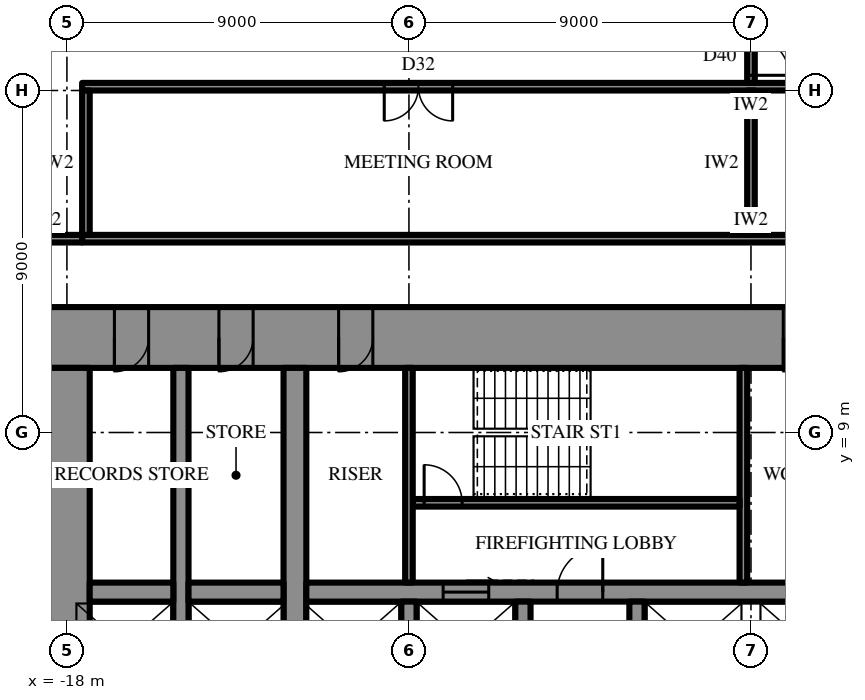
"""IFC4 building model, lengths in metres.
Left out: names, types, materials, properties, quantities, classifications, styles, units other than length and angle.
Written with IfcOpenShell. Run it as: python <this file> out.ifc"""

import sys

from ifc_helpers import new_model, si_unit, direction, frame, frame_2d, origin, place, context, subcontext, project, spatial, rectangle, extrude, element, fill, save


model = new_model("IFC4")
c1 = context("Model", 3, precision=1e-05, world=origin(), true_north=direction((0.0, 1.0)))
c2 = subcontext(c1, "Body", "Model", "MODEL_VIEW")
j1 = project(units=[si_unit("LENGTHUNIT", "METRE"), si_unit("PLANEANGLEUNIT", "RADIAN")], contexts=[c1])
p1 = place(None, origin())
s1 = spatial("IfcSite", under=j1, at=p1, CompositionType="ELEMENT")
p2 = place(p1, origin())
s2 = spatial("IfcBuilding", under=s1, at=p2, CompositionType="ELEMENT")
p3 = place(p2, frame((0.0, 0.0, 27.7)))
s3 = spatial("IfcBuildingStorey", under=s2, at=p3, CompositionType="ELEMENT", Elevation=27.7)
p4 = place(p3, frame((-18.6, 11.5, 0.0), z_axis=(0.0, 0.0, 1.0), x_axis=(1.0, 0.0, 0.0)))
e1 = element("IfcWall", 1, at=p4, inside=s3, PredefinedType="SHEAR", context=c2, shape_type="SweptSolid", body=[
    extrude(rectangle(XDim=37.2, YDim=1.6, at=frame_2d((18.6, 0.0))), origin(), (0.0, 0.0, 1.0), 4.2),
])
p5 = place(p4, frame((19.45, 0.0, 0.0)))
e2 = element("IfcOpeningElement", 2, at=p5, cuts=e1, PredefinedType="OPENING", context=c2, shape_type="SweptSolid", body=[
    extrude(rectangle(XDim=0.9, YDim=2.2, at=frame_2d((0.45, 1.1))), frame((0.0, 0.81, 0.0), z_axis=(0.0, -1.0, 0.0), x_axis=(1.0, 0.0, 0.0)), (0.0, 0.0, 1.0), 1.62),
])
p6 = place(p4, frame((22.45, 0.0, 0.0)))
e3 = element("IfcOpeningElement", 3, at=p6, cuts=e1, PredefinedType="OPENING", context=c2, shape_type="SweptSolid", body=[
    extrude(rectangle(XDim=0.9, YDim=2.2, at=frame_2d((0.45, 1.1))), frame((0.0, 0.81, 0.0), z_axis=(0.0, -1.0, 0.0), x_axis=(1.0, 0.0, 0.0)), (0.0, 0.0, 1.0), 1.62),
])
p7 = place(p4, frame((25.5, 0.0, 0.0)))
e4 = element("IfcOpeningElement", 4, at=p7, cuts=e1, PredefinedType="OPENING", context=c2, shape_type="SweptSolid", body=[
    extrude(rectangle(XDim=1.0, YDim=2.2, at=frame_2d((0.5, 1.1))), frame((0.0, 0.81, 0.0), z_axis=(0.0, -1.0, 0.0), x_axis=(1.0, 0.0, 0.0)), (0.0, 0.0, 1.0), 1.62),
])
p8 = place(p4, frame((1.85, 0.0, 0.0)))
e5 = element("IfcOpeningElement", 5, at=p8, cuts=e1, PredefinedType="OPENING", context=c2, shape_type="SweptSolid", body=[
    extrude(rectangle(XDim=0.9, YDim=2.2, at=frame_2d((0.45, 1.1))), frame((0.0, 0.81, 0.0), z_axis=(0.0, -1.0, 0.0), x_axis=(1.0, 0.0, 0.0)), (0.0, 0.0, 1.0), 1.62),
])
p9 = place(p4, frame((4.6, 0.0, 0.0)))
e6 = element("IfcOpeningElement", 6, at=p9, cuts=e1, PredefinedType="OPENING", context=c2, shape_type="SweptSolid", body=[
    extrude(rectangle(XDim=0.9, YDim=2.2, at=frame_2d((0.45, 1.1))), frame((0.0, 0.81, 0.0), z_axis=(0.0, -1.0, 0.0), x_axis=(1.0, 0.0, 0.0)), (0.0, 0.0, 1.0), 1.62),
])
p10 = place(p4, frame((7.75, 0.0, 0.0)))
e7 = element("IfcOpeningElement", 7, at=p10, cuts=e1, PredefinedType="OPENING", context=c2, shape_type="SweptSolid", body=[
    extrude(rectangle(XDim=0.9, YDim=2.2, at=frame_2d((0.45, 1.1))), frame((0.0, 0.81, 0.0), z_axis=(0.0, -1.0, 0.0), x_axis=(1.0, 0.0, 0.0)), (0.0, 0.0, 1.0), 1.62),
])
p11 = place(p4, frame((28.55, 0.0, 0.0)))
e8 = element("IfcOpeningElement", 8, at=p11, cuts=e1, PredefinedType="OPENING", context=c2, shape_type="SweptSolid", body=[
    extrude(rectangle(XDim=0.9, YDim=2.2, at=frame_2d((0.45, 1.1))), frame((0.0, 0.81, 0.0), z_axis=(0.0, -1.0, 0.0), x_axis=(1.0, 0.0, 0.0)), (0.0, 0.0, 1.0), 1.62),
])
p12 = place(p4, frame((31.7, 0.0, 0.0)))
e9 = element("IfcOpeningElement", 9, at=p12, cuts=e1, PredefinedType="OPENING", context=c2, shape_type="SweptSolid", body=[
    extrude(rectangle(XDim=0.9, YDim=2.2, at=frame_2d((0.45, 1.1))), frame((0.0, 0.81, 0.0), z_axis=(0.0, -1.0, 0.0), x_axis=(1.0, 0.0, 0.0)), (0.0, 0.0, 1.0), 1.62),
])
p13 = place(p4, frame((34.45, 0.0, 0.0)))
e10 = element("IfcOpeningElement", 10, at=p13, cuts=e1, PredefinedType="OPENING", context=c2, shape_type="SweptSolid", body=[
    extrude(rectangle(XDim=0.9, YDim=2.2, at=frame_2d((0.45, 1.1))), frame((0.0, 0.81, 0.0), z_axis=(0.0, -1.0, 0.0), x_axis=(1.0, 0.0, 0.0)), (0.0, 0.0, 1.0), 1.62),
])
p14 = place(p3, frame((-18.0, 10.7, 0.0), z_axis=(0.0, 0.0, 1.0), x_axis=(0.0, -1.0, 0.0)))
e11 = element("IfcWall", 11, at=p14, inside=s3, PredefinedType="SHEAR", context=c2, shape_type="SweptSolid", body=[
    extrude(rectangle(XDim=21.4, YDim=1.2, at=frame_2d((10.7, 0.0))), origin(), (0.0, 0.0, 1.0), 4.2),
])
p15 = place(p14, frame((9.8, 0.0, 0.0)))
e12 = element("IfcOpeningElement", 12, at=p15, cuts=e11, PredefinedType="OPENING", context=c2, shape_type="SweptSolid", body=[
    extrude(rectangle(XDim=1.8, YDim=2.4, at=frame_2d((0.9, 1.2))), frame((0.0, 0.61, 0.0), z_axis=(0.0, -1.0, 0.0), x_axis=(1.0, 0.0, 0.0)), (0.0, 0.0, 1.0), 1.22),
])
p16 = place(p3, frame((-12.0, -10.7, 0.0), z_axis=(0.0, 0.0, 1.0), x_axis=(0.0, 1.0, 0.0)))
e13 = element("IfcWall", 13, at=p16, inside=s3, PredefinedType="SHEAR", context=c2, shape_type="SweptSolid", body=[
    extrude(rectangle(XDim=21.4, YDim=0.6, at=frame_2d((10.7, 0.0))), origin(), (0.0, 0.0, 1.0), 4.2),
])
p17 = place(p16, frame((9.8, 0.0, 0.0)))
e14 = element("IfcOpeningElement", 14, at=p17, cuts=e13, PredefinedType="OPENING", context=c2, shape_type="SweptSolid", body=[
    extrude(rectangle(XDim=1.8, YDim=2.4, at=frame_2d((0.9, 1.2))), frame((0.0, 0.31, 0.0), z_axis=(0.0, -1.0, 0.0), x_axis=(1.0, 0.0, 0.0)), (0.0, 0.0, 1.0), 0.62),
])
p18 = place(p3, frame((-15.0, -10.7, 0.0), z_axis=(0.0, 0.0, 1.0), x_axis=(0.0, 1.0, 0.0)))
e15 = element("IfcWall", 15, at=p18, inside=s3, PredefinedType="SHEAR", context=c2, shape_type="SweptSolid", body=[
    extrude(rectangle(XDim=21.4, YDim=0.4, at=frame_2d((10.7, 0.0))), origin(), (0.0, 0.0, 1.0), 4.2),
])
p19 = place(p18, frame((9.8, 0.0, 0.0)))
e16 = element("IfcOpeningElement", 16, at=p19, cuts=e15, PredefinedType="OPENING", context=c2, shape_type="SweptSolid", body=[
    extrude(rectangle(XDim=1.8, YDim=2.4, at=frame_2d((0.9, 1.2))), frame((0.0, 0.21, 0.0), z_axis=(0.0, -1.0, 0.0), x_axis=(1.0, 0.0, 0.0)), (0.0, 0.0, 1.0), 0.42),
])
p20 = place(p3, frame((-17.4, 4.8, 0.0), z_axis=(0.0, 0.0, 1.0), x_axis=(1.0, 0.0, 0.0)))
e17 = element("IfcWall", 17, at=p20, inside=s3, PredefinedType="SHEAR", context=c2, shape_type="SweptSolid", body=[
    extrude(rectangle(XDim=2.2, YDim=0.5, at=frame_2d((1.1, 0.0))), origin(), (0.0, 0.0, 1.0), 4.2),
])
p21 = place(p3, frame((-14.8, 4.8, 0.0), z_axis=(0.0, 0.0, 1.0), x_axis=(1.0, 0.0, 0.0)))
e18 = element("IfcWall", 18, at=p21, inside=s3, PredefinedType="SHEAR", context=c2, shape_type="SweptSolid", body=[
    extrude(rectangle(XDim=2.5, YDim=0.5, at=frame_2d((1.25, 0.0))), origin(), (0.0, 0.0, 1.0), 4.2),
])
p22 = place(p3, frame((-11.7, 4.8, 0.0), z_axis=(0.0, 0.0, 1.0), x_axis=(1.0, 0.0, 0.0)))
e19 = element("IfcWall", 19, at=p22, inside=s3, PredefinedType="SHEAR", context=c2, shape_type="SweptSolid", body=[
    extrude(rectangle(XDim=23.4, YDim=0.5, at=frame_2d((11.7, 0.0))), origin(), (0.0, 0.0, 1.0), 4.2),
])
p23 = place(p22, frame((6.6, 0.0, 0.0)))
e20 = element("IfcOpeningElement", 20, at=p23, cuts=e19, PredefinedType="OPENING", context=c2, shape_type="SweptSolid", body=[
    extrude(rectangle(XDim=1.2, YDim=2.2, at=frame_2d((0.6, 1.1))), frame((0.0, 0.26, 0.0), z_axis=(0.0, -1.0, 0.0), x_axis=(1.0, 0.0, 0.0)), (0.0, 0.0, 1.0), 0.52),
])
p24 = place(p22, frame((3.6, 0.0, 0.0)))
e21 = element("IfcOpeningElement", 21, at=p24, cuts=e19, PredefinedType="OPENING", context=c2, shape_type="SweptSolid", body=[
    extrude(rectangle(XDim=1.2, YDim=2.2, at=frame_2d((0.6, 1.1))), frame((0.0, 0.26, 0.0), z_axis=(0.0, -1.0, 0.0), x_axis=(1.0, 0.0, 0.0)), (0.0, 0.0, 1.0), 0.52),
])
for number, where, z_axis, x_axis in (
    (22, (-9.0, 2.25, 0.0), (0.0, 0.0, 1.0), (0.0, 1.0, 0.0)),
    (23, (-6.0, 2.25, 0.0), (0.0, 0.0, 1.0), (0.0, 1.0, 0.0)),
    (24, (-3.0, 2.25, 0.0), (0.0, 0.0, 1.0), (0.0, 1.0, 0.0)),
):
    element("IfcWall", number, at=place(p3, frame(where, z_axis=z_axis, x_axis=x_axis)), inside=s3, PredefinedType="SHEAR", context=c2, shape_type="SweptSolid", body=[
        extrude(rectangle(XDim=2.3, YDim=0.4, at=frame_2d((1.15, 0.0))), origin(), (0.0, 0.0, 1.0), 4.2),
    ])
p25 = place(p3, frame((-0.2, 5.05, 0.0), z_axis=(0.0, 0.0, 1.0), x_axis=(0.0, 1.0, 0.0)))
e25 = element("IfcWall", 25, at=p25, inside=s3, PredefinedType="SHEAR", context=c2, shape_type="SweptSolid", body=[
    extrude(rectangle(XDim=5.65, YDim=0.2, at=frame_2d((2.825, 0.0))), origin(), (0.0, 0.0, 1.0), 4.2),
])
p26 = place(p3, frame((-8.9, 7.15, 0.0), z_axis=(0.0, 0.0, 1.0), x_axis=(1.0, 0.0, 0.0)))
e26 = element("IfcWall", 26, at=p26, inside=s3, PredefinedType="SHEAR", context=c2, shape_type="SweptSolid", body=[
    extrude(rectangle(XDim=8.6, YDim=0.2, at=frame_2d((4.3, 0.0))), origin(), (0.0, 0.0, 1.0), 4.2),
])
p27 = place(p26, frame((0.3, 0.0, 0.0)))
e27 = element("IfcOpeningElement", 27, at=p27, cuts=e26, PredefinedType="OPENING", context=c2, shape_type="SweptSolid", body=[
    extrude(rectangle(XDim=1.0, YDim=2.2, at=frame_2d((0.5, 1.1))), frame((0.0, 0.11, 0.0), z_axis=(0.0, -1.0, 0.0), x_axis=(1.0, 0.0, 0.0)), (0.0, 0.0, 1.0), 0.22),
])
p28 = place(p3, frame((-9.0, 5.05, 0.0), z_axis=(0.0, 0.0, 1.0), x_axis=(0.0, 1.0, 0.0)))
e28 = element("IfcWall", 28, at=p28, inside=s3, PredefinedType="PARTITIONING", context=c2, shape_type="SweptSolid", body=[
    extrude(rectangle(XDim=5.65, YDim=0.2, at=frame_2d((2.825, 0.0))), origin(), (0.0, 0.0, 1.0), 4.0),
])
p29 = place(p3, frame((-17.6, 14.1, 0.0), z_axis=(0.0, 0.0, 1.0), x_axis=(1.0, 0.0, 0.0)))
e29 = element("IfcWall", 29, at=p29, inside=s3, PredefinedType="PARTITIONING", context=c2, shape_type="SweptSolid", body=[
    extrude(rectangle(XDim=35.2, YDim=0.2, at=frame_2d((17.6, 0.0))), origin(), (0.0, 0.0, 1.0), 4.0),
])
p30 = place(p3, frame((-17.6, 18.1, 0.0), z_axis=(0.0, 0.0, 1.0), x_axis=(1.0, 0.0, 0.0)))
e30 = element("IfcWall", 30, at=p30, inside=s3, PredefinedType="PARTITIONING", context=c2, shape_type="SweptSolid", body=[
    extrude(rectangle(XDim=35.2, YDim=0.2, at=frame_2d((17.6, 0.0))), origin(), (0.0, 0.0, 1.0), 4.0),
])
p31 = place(p30, frame((7.95, 0.0, 0.0)))
e31 = element("IfcOpeningElement", 31, at=p31, cuts=e30, PredefinedType="OPENING", context=c2, shape_type="SweptSolid", body=[
    extrude(rectangle(XDim=1.8, YDim=2.4, at=frame_2d((0.9, 1.2))), frame((0.0, 0.11, 0.0), z_axis=(0.0, -1.0, 0.0), x_axis=(1.0, 0.0, 0.0)), (0.0, 0.0, 1.0), 0.22),
])
p32 = place(p30, frame((25.45, 0.0, 0.0)))
e32 = element("IfcOpeningElement", 32, at=p32, cuts=e30, PredefinedType="OPENING", context=c2, shape_type="SweptSolid", body=[
    extrude(rectangle(XDim=1.8, YDim=2.4, at=frame_2d((0.9, 1.2))), frame((0.0, 0.11, 0.0), z_axis=(0.0, -1.0, 0.0), x_axis=(1.0, 0.0, 0.0)), (0.0, 0.0, 1.0), 0.22),
])
p33 = place(p3, frame((-17.5, 14.2, 0.0), z_axis=(0.0, 0.0, 1.0), x_axis=(0.0, 1.0, 0.0)))
e33 = element("IfcWall", 33, at=p33, inside=s3, PredefinedType="PARTITIONING", context=c2, shape_type="SweptSolid", body=[
    extrude(rectangle(XDim=3.8, YDim=0.2, at=frame_2d((1.9, 0.0))), origin(), (0.0, 0.0, 1.0), 4.0),
])
p34 = place(p3, frame((0.0, 14.2, 0.0), z_axis=(0.0, 0.0, 1.0), x_axis=(0.0, 1.0, 0.0)))
e34 = element("IfcWall", 34, at=p34, inside=s3, PredefinedType="PARTITIONING", context=c2, shape_type="SweptSolid", body=[
    extrude(rectangle(XDim=3.8, YDim=0.2, at=frame_2d((1.9, 0.0))), origin(), (0.0, 0.0, 1.0), 2.944),
])
p35 = place(p3, frame((-19.6, 14.1, 0.0), z_axis=(0.0, 0.0, 1.0), x_axis=(1.0, 0.0, 0.0)))
e35 = element("IfcWall", 35, at=p35, inside=s3, PredefinedType="PARTITIONING", context=c2, shape_type="SweptSolid", body=[
    extrude(rectangle(XDim=2.0, YDim=0.2, at=frame_2d((1.0, 0.0))), origin(), (0.0, 0.0, 1.0), 4.0),
])
p36 = place(p3, frame((0.0, 18.2, 0.0), z_axis=(0.0, 0.0, 1.0), x_axis=(0.0, 1.0, 0.0)))
e36 = element("IfcWall", 36, at=p36, inside=s3, PredefinedType="PARTITIONING", context=c2, shape_type="SweptSolid", body=[
    extrude(rectangle(XDim=6.7, YDim=0.2, at=frame_2d((3.35, 0.0))), origin(), (0.0, 0.0, 1.0), 2.944),
])
p37 = place(p36, frame((0.2, 0.0, 0.0)))
e37 = element("IfcOpeningElement", 37, at=p37, cuts=e36, PredefinedType="OPENING", context=c2, shape_type="SweptSolid", body=[
    extrude(rectangle(XDim=1.0, YDim=2.2, at=frame_2d((0.5, 1.1))), frame((0.0, 0.11, 0.0), z_axis=(0.0, -1.0, 0.0), x_axis=(1.0, 0.0, 0.0)), (0.0, 0.0, 1.0), 0.22),
])
p38 = place(p23, origin())
e38 = element("IfcDoor", 38, at=p38, inside=s3, OperationType="SINGLE_SWING_LEFT", PredefinedType="DOOR", context=c2, shape_type="SweptSolid", body=[
    extrude(rectangle(XDim=1.2, YDim=2.2, at=frame_2d((0.6, 1.1))), frame((0.0, 0.025, 0.0), z_axis=(0.0, -1.0, 0.0), x_axis=(1.0, 0.0, 0.0)), (0.0, 0.0, 1.0), 0.05),
])
fill(e20, e38)
p39 = place(p27, origin())
e39 = element("IfcDoor", 39, at=p39, inside=s3, OperationType="SINGLE_SWING_RIGHT", PredefinedType="DOOR", context=c2, shape_type="SweptSolid", body=[
    extrude(rectangle(XDim=1.0, YDim=2.2, at=frame_2d((0.5, 1.1))), frame((0.0, 0.025, 0.0), z_axis=(0.0, -1.0, 0.0), x_axis=(1.0, 0.0, 0.0)), (0.0, 0.0, 1.0), 0.05),
])
fill(e27, e39)
p40 = place(p5, frame((0.9, 0.0, 0.0), z_axis=(0.0, 0.0, 1.0), x_axis=(-1.0, 0.0, 0.0)))
e40 = element("IfcDoor", 40, at=p40, inside=s3, OperationType="SINGLE_SWING_LEFT", PredefinedType="DOOR", context=c2, shape_type="SweptSolid", body=[
    extrude(rectangle(XDim=0.9, YDim=2.2, at=frame_2d((0.45, 1.1))), frame((0.0, 0.025, 0.0), z_axis=(0.0, -1.0, 0.0), x_axis=(1.0, 0.0, 0.0)), (0.0, 0.0, 1.0), 0.05),
])
fill(e2, e40)
p41 = place(p8, frame((0.9, 0.0, 0.0), z_axis=(0.0, 0.0, 1.0), x_axis=(-1.0, 0.0, 0.0)))
e41 = element("IfcDoor", 41, at=p41, inside=s3, OperationType="SINGLE_SWING_LEFT", PredefinedType="DOOR", context=c2, shape_type="SweptSolid", body=[
    extrude(rectangle(XDim=0.9, YDim=2.2, at=frame_2d((0.45, 1.1))), frame((0.0, 0.025, 0.0), z_axis=(0.0, -1.0, 0.0), x_axis=(1.0, 0.0, 0.0)), (0.0, 0.0, 1.0), 0.05),
])
fill(e5, e41)
p42 = place(p9, frame((0.9, 0.0, 0.0), z_axis=(0.0, 0.0, 1.0), x_axis=(-1.0, 0.0, 0.0)))
e42 = element("IfcDoor", 42, at=p42, inside=s3, OperationType="SINGLE_SWING_LEFT", PredefinedType="DOOR", context=c2, shape_type="SweptSolid", body=[
    extrude(rectangle(XDim=0.9, YDim=2.2, at=frame_2d((0.45, 1.1))), frame((0.0, 0.025, 0.0), z_axis=(0.0, -1.0, 0.0), x_axis=(1.0, 0.0, 0.0)), (0.0, 0.0, 1.0), 0.05),
])
fill(e6, e42)
p43 = place(p10, frame((0.9, 0.0, 0.0), z_axis=(0.0, 0.0, 1.0), x_axis=(-1.0, 0.0, 0.0)))
e43 = element("IfcDoor", 43, at=p43, inside=s3, OperationType="SINGLE_SWING_LEFT", PredefinedType="DOOR", context=c2, shape_type="SweptSolid", body=[
    extrude(rectangle(XDim=0.9, YDim=2.2, at=frame_2d((0.45, 1.1))), frame((0.0, 0.025, 0.0), z_axis=(0.0, -1.0, 0.0), x_axis=(1.0, 0.0, 0.0)), (0.0, 0.0, 1.0), 0.05),
])
fill(e7, e43)
p44 = place(p24, origin())
e44 = element("IfcDoor", 44, at=p44, inside=s3, OperationType="SLIDING_TO_LEFT", PredefinedType="DOOR", context=c2, shape_type="SweptSolid", body=[
    extrude(rectangle(XDim=1.2, YDim=2.2, at=frame_2d((0.6, 1.1))), frame((0.0, 0.025, 0.0), z_axis=(0.0, -1.0, 0.0), x_axis=(1.0, 0.0, 0.0)), (0.0, 0.0, 1.0), 0.05),
])
fill(e21, e44)
p45 = place(p31, frame((1.8, 0.0, 0.0), z_axis=(0.0, 0.0, 1.0), x_axis=(-1.0, 0.0, 0.0)))
e45 = element("IfcDoor", 45, at=p45, inside=s3, OperationType="DOUBLE_DOOR_SINGLE_SWING", PredefinedType="DOOR", context=c2, shape_type="SweptSolid", body=[
    extrude(rectangle(XDim=1.8, YDim=2.4, at=frame_2d((0.9, 1.2))), frame((0.0, 0.025, 0.0), z_axis=(0.0, -1.0, 0.0), x_axis=(1.0, 0.0, 0.0)), (0.0, 0.0, 1.0), 0.05),
])
fill(e31, e45)
p46 = place(p37, frame((1.0, 0.0, 0.0), z_axis=(0.0, 0.0, 1.0), x_axis=(-1.0, 0.0, 0.0)))
e46 = element("IfcDoor", 46, at=p46, inside=s3, OperationType="SINGLE_SWING_LEFT", PredefinedType="DOOR", context=c2, shape_type="SweptSolid", body=[
    extrude(rectangle(XDim=1.0, YDim=2.2, at=frame_2d((0.5, 1.1))), frame((0.0, 0.025, 0.0), z_axis=(0.0, -1.0, 0.0), x_axis=(1.0, 0.0, 0.0)), (0.0, 0.0, 1.0), 0.05),
])
fill(e37, e46)
save(model, sys.argv[1])
